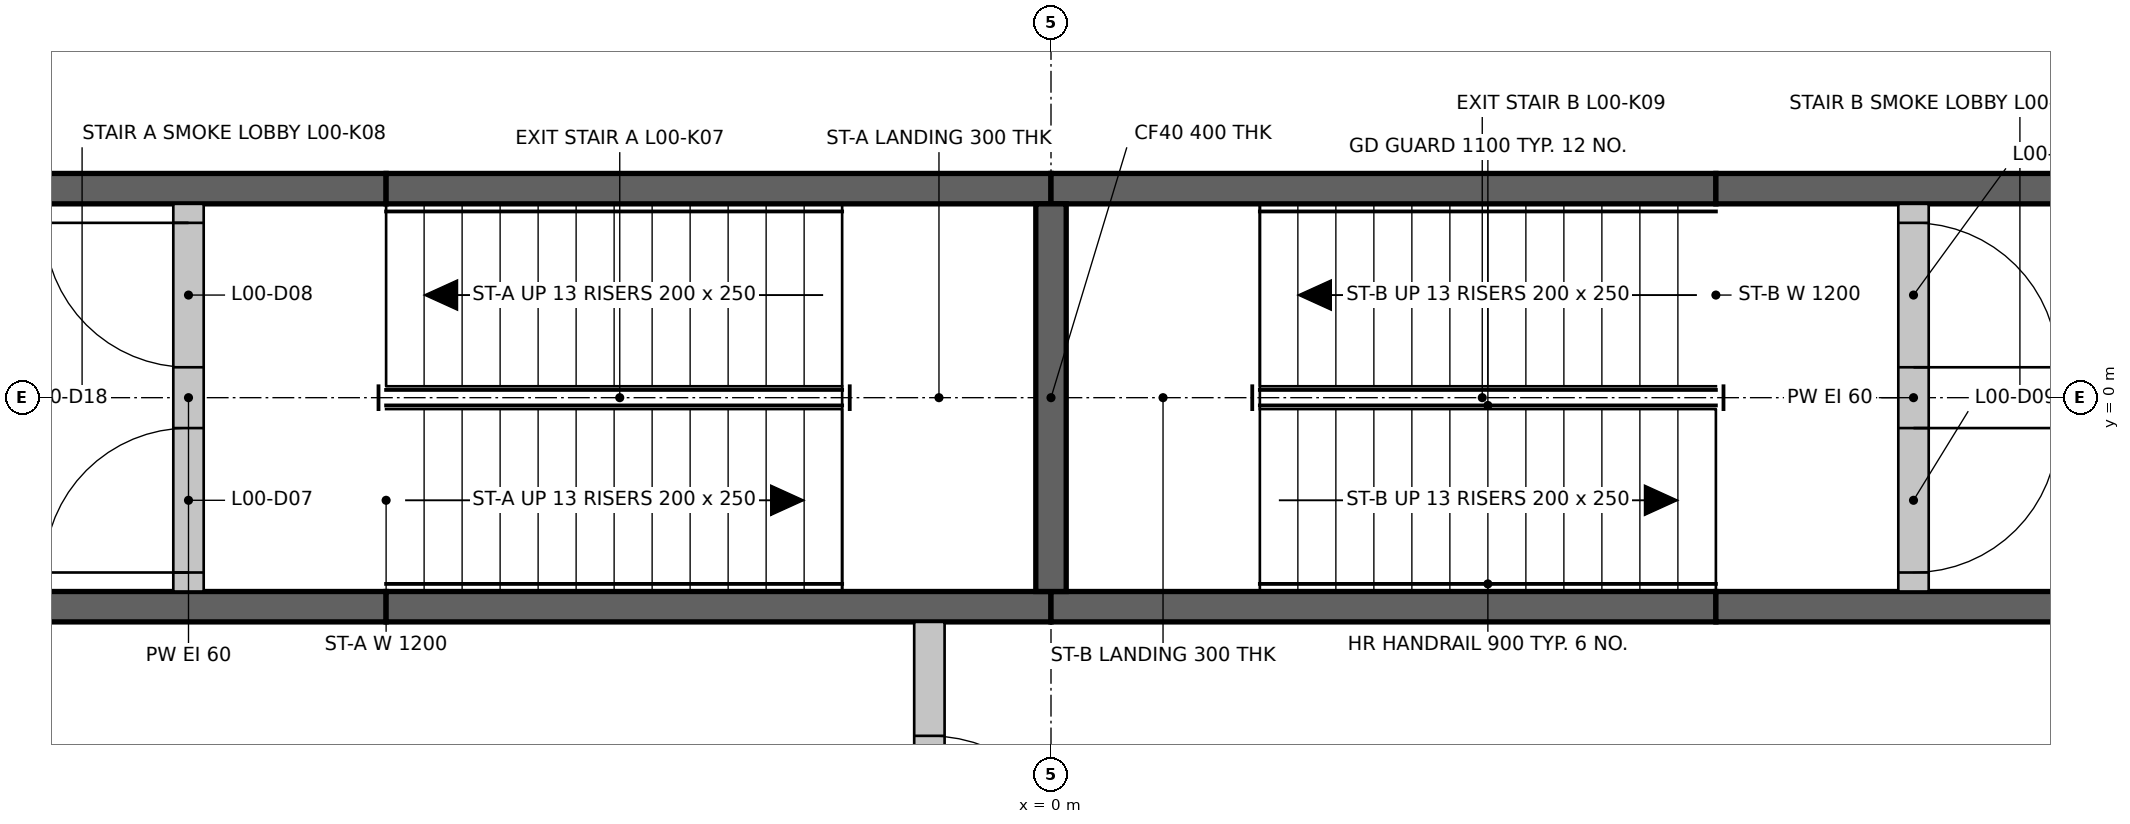
"""IFC4 building model, lengths in metres.
Left out: names, types, materials, properties, quantities, classifications, styles, units other than length and angle.
Written with IfcOpenShell. Run it as: python <this file> out.ifc"""

import sys

from ifc_helpers import new_model, si_unit, direction, frame, frame_2d, origin, place, context, subcontext, project, spatial, rectangle, extrude, element, fill, save


model = new_model("IFC4")
c1 = context("Model", 3, precision=1e-05, world=origin(), true_north=direction((0.0, 1.0)))
c2 = subcontext(c1, "Body", "Model", "MODEL_VIEW")
j1 = project(units=[si_unit("LENGTHUNIT", "METRE"), si_unit("PLANEANGLEUNIT", "RADIAN")], contexts=[c1])
p1 = place(None, origin())
s1 = spatial("IfcSite", under=j1, at=p1, CompositionType="ELEMENT")
p2 = place(p1, origin())
s2 = spatial("IfcBuilding", under=s1, at=p2, CompositionType="ELEMENT")
p3 = place(p2, origin())
s3 = spatial("IfcBuildingStorey", under=s2, at=p3, CompositionType="ELEMENT", Elevation=0.0)
p4 = place(p3, frame((-6.974, -1.375, 0.0), z_axis=(0.0, 0.0, 1.0), x_axis=(1.0, 0.0, 0.0)))
e1 = element("IfcWall", 1, at=p4, inside=s3, PredefinedType="SHEAR", context=c2, shape_type="SweptSolid", body=[
    extrude(rectangle(XDim=2.6, YDim=0.2, at=frame_2d((1.3, 0.0))), origin(), (0.0, 0.0, 1.0), 4.8),
])
for number, where, z_axis, x_axis in (
    (2, (-4.374, -1.375, 0.0), (0.0, 0.0, 1.0), (1.0, 0.0, 0.0)),
    (3, (0.0, -1.375, 0.0), (0.0, 0.0, 1.0), (1.0, 0.0, 0.0)),
):
    element("IfcWall", number, at=place(p3, frame(where, z_axis=z_axis, x_axis=x_axis)), inside=s3, PredefinedType="SHEAR", context=c2, shape_type="SweptSolid", body=[
        extrude(rectangle(XDim=4.374, YDim=0.2, at=frame_2d((2.187, 0.0))), origin(), (0.0, 0.0, 1.0), 4.8),
    ])
for number, where, z_axis, x_axis in (
    (4, (4.374, -1.375, 0.0), (0.0, 0.0, 1.0), (1.0, 0.0, 0.0)),
    (5, (-6.974, 1.375, 0.0), (0.0, 0.0, 1.0), (1.0, 0.0, 0.0)),
):
    element("IfcWall", number, at=place(p3, frame(where, z_axis=z_axis, x_axis=x_axis)), inside=s3, PredefinedType="SHEAR", context=c2, shape_type="SweptSolid", body=[
        extrude(rectangle(XDim=2.6, YDim=0.2, at=frame_2d((1.3, 0.0))), origin(), (0.0, 0.0, 1.0), 4.8),
    ])
for number, where, z_axis, x_axis in (
    (6, (-4.374, 1.375, 0.0), (0.0, 0.0, 1.0), (1.0, 0.0, 0.0)),
    (7, (0.0, 1.375, 0.0), (0.0, 0.0, 1.0), (1.0, 0.0, 0.0)),
):
    element("IfcWall", number, at=place(p3, frame(where, z_axis=z_axis, x_axis=x_axis)), inside=s3, PredefinedType="SHEAR", context=c2, shape_type="SweptSolid", body=[
        extrude(rectangle(XDim=4.374, YDim=0.2, at=frame_2d((2.187, 0.0))), origin(), (0.0, 0.0, 1.0), 4.8),
    ])
p5 = place(p3, frame((4.374, 1.375, 0.0), z_axis=(0.0, 0.0, 1.0), x_axis=(1.0, 0.0, 0.0)))
e8 = element("IfcWall", 8, at=p5, inside=s3, PredefinedType="SHEAR", context=c2, shape_type="SweptSolid", body=[
    extrude(rectangle(XDim=2.6, YDim=0.2, at=frame_2d((1.3, 0.0))), origin(), (0.0, 0.0, 1.0), 4.8),
])
p6 = place(p3, frame((0.0, -1.275, 0.0), z_axis=(0.0, 0.0, 1.0), x_axis=(0.0, 1.0, 0.0)))
e9 = element("IfcWall", 9, at=p6, inside=s3, PredefinedType="SHEAR", context=c2, shape_type="SweptSolid", body=[
    extrude(rectangle(XDim=2.55, YDim=0.2, at=frame_2d((1.275, 0.0))), origin(), (0.0, 0.0, 1.0), 4.8),
])
p7 = place(p3, frame((-0.8, -3.974, 0.0), z_axis=(0.0, 0.0, 1.0), x_axis=(0.0, 1.0, 0.0)))
e10 = element("IfcWall", 10, at=p7, inside=s3, PredefinedType="PARTITIONING", context=c2, shape_type="SweptSolid", body=[
    extrude(rectangle(XDim=2.499, YDim=0.2, at=frame_2d((1.25, 0.0))), origin(), (0.0, 0.0, 1.0), 4.8),
])
p8 = place(p7, frame((0.75, 0.0, 0.0)))
e11 = element("IfcOpeningElement", 11, at=p8, cuts=e10, PredefinedType="OPENING", context=c2, shape_type="SweptSolid", body=[
    extrude(rectangle(XDim=1.0, YDim=2.1, at=frame_2d((0.5, 1.05))), frame((0.0, 0.11, 0.0), z_axis=(0.0, -1.0, 0.0), x_axis=(1.0, 0.0, 0.0)), (0.0, 0.0, 1.0), 0.22),
])
p9 = place(p3, frame((-5.674, -1.275, 0.0), z_axis=(0.0, 0.0, 1.0), x_axis=(0.0, 1.0, 0.0)))
e12 = element("IfcWall", 12, at=p9, inside=s3, PredefinedType="PARTITIONING", context=c2, shape_type="SweptSolid", body=[
    extrude(rectangle(XDim=2.55, YDim=0.2, at=frame_2d((1.275, 0.0))), origin(), (0.0, 0.0, 1.0), 4.8),
])
p10 = place(p9, frame((0.125, 0.0, 0.0)))
e13 = element("IfcOpeningElement", 13, at=p10, cuts=e12, PredefinedType="OPENING", context=c2, shape_type="SweptSolid", body=[
    extrude(rectangle(XDim=0.95, YDim=2.1, at=frame_2d((0.475, 1.05))), frame((0.0, 0.11, 0.0), z_axis=(0.0, -1.0, 0.0), x_axis=(1.0, 0.0, 0.0)), (0.0, 0.0, 1.0), 0.22),
])
p11 = place(p9, frame((1.475, 0.0, 0.0)))
e14 = element("IfcOpeningElement", 14, at=p11, cuts=e12, PredefinedType="OPENING", context=c2, shape_type="SweptSolid", body=[
    extrude(rectangle(XDim=0.95, YDim=2.1, at=frame_2d((0.475, 1.05))), frame((0.0, 0.11, 0.0), z_axis=(0.0, -1.0, 0.0), x_axis=(1.0, 0.0, 0.0)), (0.0, 0.0, 1.0), 0.22),
])
p12 = place(p3, frame((5.674, -1.275, 0.0), z_axis=(0.0, 0.0, 1.0), x_axis=(0.0, 1.0, 0.0)))
e15 = element("IfcWall", 15, at=p12, inside=s3, PredefinedType="PARTITIONING", context=c2, shape_type="SweptSolid", body=[
    extrude(rectangle(XDim=2.55, YDim=0.2, at=frame_2d((1.275, 0.0))), origin(), (0.0, 0.0, 1.0), 4.8),
])
p13 = place(p12, frame((0.125, 0.0, 0.0)))
e16 = element("IfcOpeningElement", 16, at=p13, cuts=e15, PredefinedType="OPENING", context=c2, shape_type="SweptSolid", body=[
    extrude(rectangle(XDim=0.95, YDim=2.1, at=frame_2d((0.475, 1.05))), frame((0.0, 0.11, 0.0), z_axis=(0.0, -1.0, 0.0), x_axis=(1.0, 0.0, 0.0)), (0.0, 0.0, 1.0), 0.22),
])
p14 = place(p12, frame((1.475, 0.0, 0.0)))
e17 = element("IfcOpeningElement", 17, at=p14, cuts=e15, PredefinedType="OPENING", context=c2, shape_type="SweptSolid", body=[
    extrude(rectangle(XDim=0.95, YDim=2.1, at=frame_2d((0.475, 1.05))), frame((0.0, 0.11, 0.0), z_axis=(0.0, -1.0, 0.0), x_axis=(1.0, 0.0, 0.0)), (0.0, 0.0, 1.0), 0.22),
])
p15 = place(p10, origin())
e18 = element("IfcDoor", 18, at=p15, inside=s3, OperationType="SINGLE_SWING_LEFT", PredefinedType="DOOR", context=c2, shape_type="SweptSolid", body=[
    extrude(rectangle(XDim=0.95, YDim=2.1, at=frame_2d((0.475, 1.05))), frame((0.0, 0.025, 0.0), z_axis=(0.0, -1.0, 0.0), x_axis=(1.0, 0.0, 0.0)), (0.0, 0.0, 1.0), 0.05),
])
fill(e13, e18)
p16 = place(p11, origin())
e19 = element("IfcDoor", 19, at=p16, inside=s3, OperationType="SINGLE_SWING_RIGHT", PredefinedType="DOOR", context=c2, shape_type="SweptSolid", body=[
    extrude(rectangle(XDim=0.95, YDim=2.1, at=frame_2d((0.475, 1.05))), frame((0.0, 0.025, 0.0), z_axis=(0.0, -1.0, 0.0), x_axis=(1.0, 0.0, 0.0)), (0.0, 0.0, 1.0), 0.05),
])
fill(e14, e19)
p17 = place(p13, frame((0.95, 0.0, 0.0), z_axis=(0.0, 0.0, 1.0), x_axis=(-1.0, 0.0, 0.0)))
e20 = element("IfcDoor", 20, at=p17, inside=s3, OperationType="SINGLE_SWING_RIGHT", PredefinedType="DOOR", context=c2, shape_type="SweptSolid", body=[
    extrude(rectangle(XDim=0.95, YDim=2.1, at=frame_2d((0.475, 1.05))), frame((0.0, 0.025, 0.0), z_axis=(0.0, -1.0, 0.0), x_axis=(1.0, 0.0, 0.0)), (0.0, 0.0, 1.0), 0.05),
])
fill(e16, e20)
p18 = place(p14, frame((0.95, 0.0, 0.0), z_axis=(0.0, 0.0, 1.0), x_axis=(-1.0, 0.0, 0.0)))
e21 = element("IfcDoor", 21, at=p18, inside=s3, OperationType="SINGLE_SWING_LEFT", PredefinedType="DOOR", context=c2, shape_type="SweptSolid", body=[
    extrude(rectangle(XDim=0.95, YDim=2.1, at=frame_2d((0.475, 1.05))), frame((0.0, 0.025, 0.0), z_axis=(0.0, -1.0, 0.0), x_axis=(1.0, 0.0, 0.0)), (0.0, 0.0, 1.0), 0.05),
])
fill(e17, e21)
p19 = place(p8, frame((1.0, 0.0, 0.0), z_axis=(0.0, 0.0, 1.0), x_axis=(-1.0, 0.0, 0.0)))
e22 = element("IfcDoor", 22, at=p19, inside=s3, OperationType="SINGLE_SWING_LEFT", PredefinedType="DOOR", context=c2, shape_type="SweptSolid", body=[
    extrude(rectangle(XDim=1.0, YDim=2.1, at=frame_2d((0.5, 1.05))), frame((0.0, 0.025, 0.0), z_axis=(0.0, -1.0, 0.0), x_axis=(1.0, 0.0, 0.0)), (0.0, 0.0, 1.0), 0.05),
])
fill(e11, e22)
save(model, sys.argv[1])
